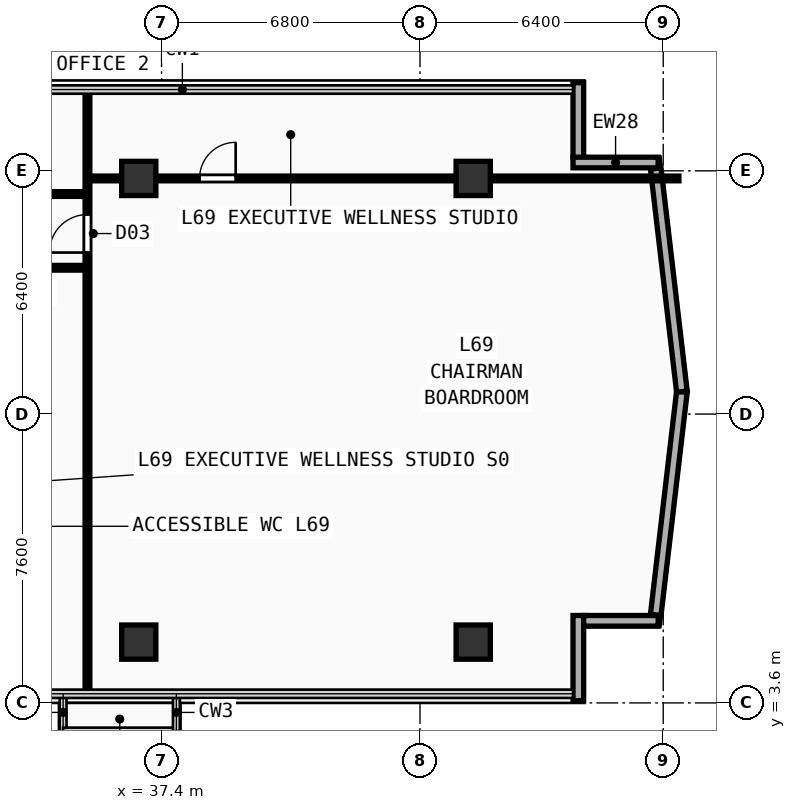
"""IFC4 building model, lengths in metres.
Left out: names, types, materials, properties, quantities, classifications, styles, units other than length and angle.
Written with IfcOpenShell. Run it as: python <this file> out.ifc"""

import sys

from ifc_helpers import new_model, si_unit, direction, frame, frame_2d, origin, origin_2d, place, context, subcontext, project, spatial, rectangle, extrude, element, fill, save


model = new_model("IFC4")
c1 = context("Model", 3, precision=1e-05, world=origin(), true_north=direction((0.0, 1.0)))
c2 = subcontext(c1, "Body", "Model", "MODEL_VIEW")
j1 = project(units=[si_unit("LENGTHUNIT", "METRE"), si_unit("PLANEANGLEUNIT", "RADIAN")], contexts=[c1])
p1 = place(None, origin())
s1 = spatial("IfcSite", under=j1, at=p1, CompositionType="ELEMENT")
p2 = place(p1, origin())
s2 = spatial("IfcBuilding", under=s1, at=p2, CompositionType="ELEMENT")
p3 = place(p2, frame((0.0, 0.0, 270.4)))
s3 = spatial("IfcBuildingStorey", under=s2, at=p3, CompositionType="ELEMENT", Elevation=270.4)
for number, where, z_axis, x_axis in (
    (1, (36.8, 5.2, 0.0), (0.0, 0.0, 1.0), (1.0, 0.0, 0.0)),
    (2, (45.6, 5.2, 0.0), (0.0, 0.0, 1.0), (1.0, 0.0, 0.0)),
    (3, (36.8, 17.4, 0.0), (0.0, 0.0, 1.0), (1.0, 0.0, 0.0)),
    (4, (45.6, 17.4, 0.0), (0.0, 0.0, 1.0), (1.0, 0.0, 0.0)),
):
    element("IfcColumn", number, at=place(p3, frame(where, z_axis=z_axis, x_axis=x_axis)), inside=s3, PredefinedType="COLUMN", context=c2, shape_type="SweptSolid", body=[
        extrude(rectangle(XDim=0.9, YDim=0.9, at=origin_2d()), origin(), (0.0, 0.0, 1.0), 3.56),
    ])
p4 = place(p3, frame((48.366, 3.66, 0.0), z_axis=(0.0, 0.0, 1.0), x_axis=(0.0, 1.0, 0.0)))
e5 = element("IfcWall", 5, at=p4, inside=s3, PredefinedType="SOLIDWALL", context=c2, shape_type="SweptSolid", body=[
    extrude(rectangle(XDim=2.24, YDim=0.28, at=frame_2d((1.12, 0.0))), origin(), (0.0, 0.0, 1.0), 3.56),
])
p5 = place(p3, frame((48.506, 5.76, 0.0), z_axis=(0.0, 0.0, 1.0), x_axis=(1.0, 0.0, 0.0)))
e6 = element("IfcWall", 6, at=p5, inside=s3, PredefinedType="SOLIDWALL", context=c2, shape_type="SweptSolid", body=[
    extrude(rectangle(XDim=1.96, YDim=0.28, at=frame_2d((0.98, 0.0))), origin(), (0.0, 0.0, 1.0), 3.56),
])
p6 = place(p3, frame((48.366, 17.944, 0.0), z_axis=(0.0, 0.0, 1.0), x_axis=(0.0, 1.0, 0.0)))
e7 = element("IfcWall", 7, at=p6, inside=s3, PredefinedType="SOLIDWALL", context=c2, shape_type="SweptSolid", body=[
    extrude(rectangle(XDim=1.975, YDim=0.28, at=frame_2d((0.988, 0.0))), origin(), (0.0, 0.0, 1.0), 3.56),
])
p7 = place(p3, frame((48.226, 17.819, 0.0), z_axis=(0.0, 0.0, 1.0), x_axis=(1.0, 0.0, 0.0)))
e8 = element("IfcWall", 8, at=p7, inside=s3, PredefinedType="SOLIDWALL", context=c2, shape_type="SweptSolid", body=[
    extrude(rectangle(XDim=2.24, YDim=0.28, at=frame_2d((1.12, 0.0))), origin(), (0.0, 0.0, 1.0), 3.56),
])
p8 = place(p3, frame((50.402, 5.917, 0.0), z_axis=(0.0, 0.0, 1.0), x_axis=(0.116534559493, 0.993186637266, 0.0)))
e9 = element("IfcWall", 9, at=p8, inside=s3, PredefinedType="SOLIDWALL", context=c2, shape_type="SweptSolid", body=[
    extrude(rectangle(XDim=5.912, YDim=0.28, at=frame_2d((2.956, 0.0))), origin(), (0.0, 0.0, 1.0), 3.56),
])
p9 = place(p3, frame((51.091, 11.791, 0.0), z_axis=(0.0, 0.0, 1.0), x_axis=(-0.116539339197, 0.993186076433, 0.0)))
e10 = element("IfcWall", 10, at=p9, inside=s3, PredefinedType="SOLIDWALL", context=c2, shape_type="SweptSolid", body=[
    extrude(rectangle(XDim=5.912, YDim=0.28, at=frame_2d((2.956, 0.0))), origin(), (0.0, 0.0, 1.0), 3.56),
])
p10 = place(p3, frame((29.4, 15.05, 0.0), z_axis=(0.0, 0.0, 1.0), x_axis=(1.0, 0.0, 0.0)))
e11 = element("IfcWall", 11, at=p10, inside=s3, PredefinedType="PARTITIONING", context=c2, shape_type="SweptSolid", body=[
    extrude(rectangle(XDim=6.05, YDim=0.125, at=frame_2d((3.025, 0.0))), origin(), (0.0, 0.0, 1.0), 3.56),
])
p11 = place(p10, frame((2.002, 0.0, 0.0)))
e12 = element("IfcOpeningElement", 12, at=p11, cuts=e11, PredefinedType="OPENING", context=c2, shape_type="SweptSolid", body=[
    extrude(rectangle(XDim=0.95, YDim=2.15, at=frame_2d((0.475, 1.075))), frame((0.0, 0.073, 0.0), z_axis=(0.0, -1.0, 0.0), x_axis=(1.0, 0.0, 0.0)), (0.0, 0.0, 1.0), 0.145),
])
p12 = place(p3, frame((35.45, 3.84, 0.0), z_axis=(0.0, 0.0, 1.0), x_axis=(0.0, 1.0, 0.0)))
e13 = element("IfcWall", 13, at=p12, inside=s3, PredefinedType="PARTITIONING", context=c2, shape_type="SweptSolid", body=[
    extrude(rectangle(XDim=15.92, YDim=0.125, at=frame_2d((7.96, 0.0))), origin(), (0.0, 0.0, 1.0), 3.56),
])
p13 = place(p12, frame((11.61, 0.0, 0.0)))
e14 = element("IfcOpeningElement", 14, at=p13, cuts=e13, PredefinedType="OPENING", context=c2, shape_type="SweptSolid", body=[
    extrude(rectangle(XDim=1.0, YDim=2.2, at=frame_2d((0.5, 1.1))), frame((0.0, 0.073, 0.0), z_axis=(0.0, -1.0, 0.0), x_axis=(1.0, 0.0, 0.0)), (0.0, 0.0, 1.0), 0.145),
])
p14 = place(p3, frame((35.45, 17.4, 0.0), z_axis=(0.0, 0.0, 1.0), x_axis=(1.0, 0.0, 0.0)))
e15 = element("IfcWall", 15, at=p14, inside=s3, PredefinedType="PARTITIONING", context=c2, shape_type="SweptSolid", body=[
    extrude(rectangle(XDim=15.563, YDim=0.125, at=frame_2d((7.781, 0.0))), origin(), (0.0, 0.0, 1.0), 3.2),
])
p15 = place(p14, frame((2.95, 0.0, 0.0)))
e16 = element("IfcOpeningElement", 16, at=p15, cuts=e15, PredefinedType="OPENING", context=c2, shape_type="SweptSolid", body=[
    extrude(rectangle(XDim=0.95, YDim=2.15, at=frame_2d((0.475, 1.075))), frame((0.0, 0.073, 0.0), z_axis=(0.0, -1.0, 0.0), x_axis=(1.0, 0.0, 0.0)), (0.0, 0.0, 1.0), 0.145),
])
p16 = place(p3, frame((23.65, 16.99, 0.0), z_axis=(0.0, 0.0, 1.0), x_axis=(1.0, 0.0, 0.0)))
e17 = element("IfcWall", 17, at=p16, inside=s3, PredefinedType="PARTITIONING", context=c2, shape_type="SweptSolid", body=[
    extrude(rectangle(XDim=11.8, YDim=0.125, at=frame_2d((5.9, 0.0))), origin(), (0.0, 0.0, 1.0), 3.56),
])
p17 = place(p16, frame((1.683, 0.0, 0.0)))
e18 = element("IfcOpeningElement", 18, at=p17, cuts=e17, PredefinedType="OPENING", context=c2, shape_type="SweptSolid", body=[
    extrude(rectangle(XDim=0.95, YDim=2.15, at=frame_2d((0.475, 1.075))), frame((0.0, 0.073, 0.0), z_axis=(0.0, -1.0, 0.0), x_axis=(1.0, 0.0, 0.0)), (0.0, 0.0, 1.0), 0.145),
])
p18 = place(p16, frame((7.725, 0.0, 0.0)))
e19 = element("IfcOpeningElement", 19, at=p18, cuts=e17, PredefinedType="OPENING", context=c2, shape_type="SweptSolid", body=[
    extrude(rectangle(XDim=0.95, YDim=2.15, at=frame_2d((0.475, 1.075))), frame((0.0, 0.073, 0.0), z_axis=(0.0, -1.0, 0.0), x_axis=(1.0, 0.0, 0.0)), (0.0, 0.0, 1.0), 0.145),
])
p19 = place(p13, origin())
e20 = element("IfcDoor", 20, at=p19, inside=s3, OperationType="SINGLE_SWING_LEFT", PredefinedType="DOOR", context=c2, shape_type="SweptSolid", body=[
    extrude(rectangle(XDim=1.0, YDim=2.2, at=frame_2d((0.5, 1.1))), frame((0.0, 0.025, 0.0), z_axis=(0.0, -1.0, 0.0), x_axis=(1.0, 0.0, 0.0)), (0.0, 0.0, 1.0), 0.05),
])
fill(e14, e20)
p20 = place(p15, origin())
e21 = element("IfcDoor", 21, at=p20, inside=s3, OperationType="SINGLE_SWING_RIGHT", PredefinedType="DOOR", context=c2, shape_type="SweptSolid", body=[
    extrude(rectangle(XDim=0.95, YDim=2.15, at=frame_2d((0.475, 1.075))), frame((0.0, 0.025, 0.0), z_axis=(0.0, -1.0, 0.0), x_axis=(1.0, 0.0, 0.0)), (0.0, 0.0, 1.0), 0.05),
])
fill(e16, e21)
save(model, sys.argv[1])
